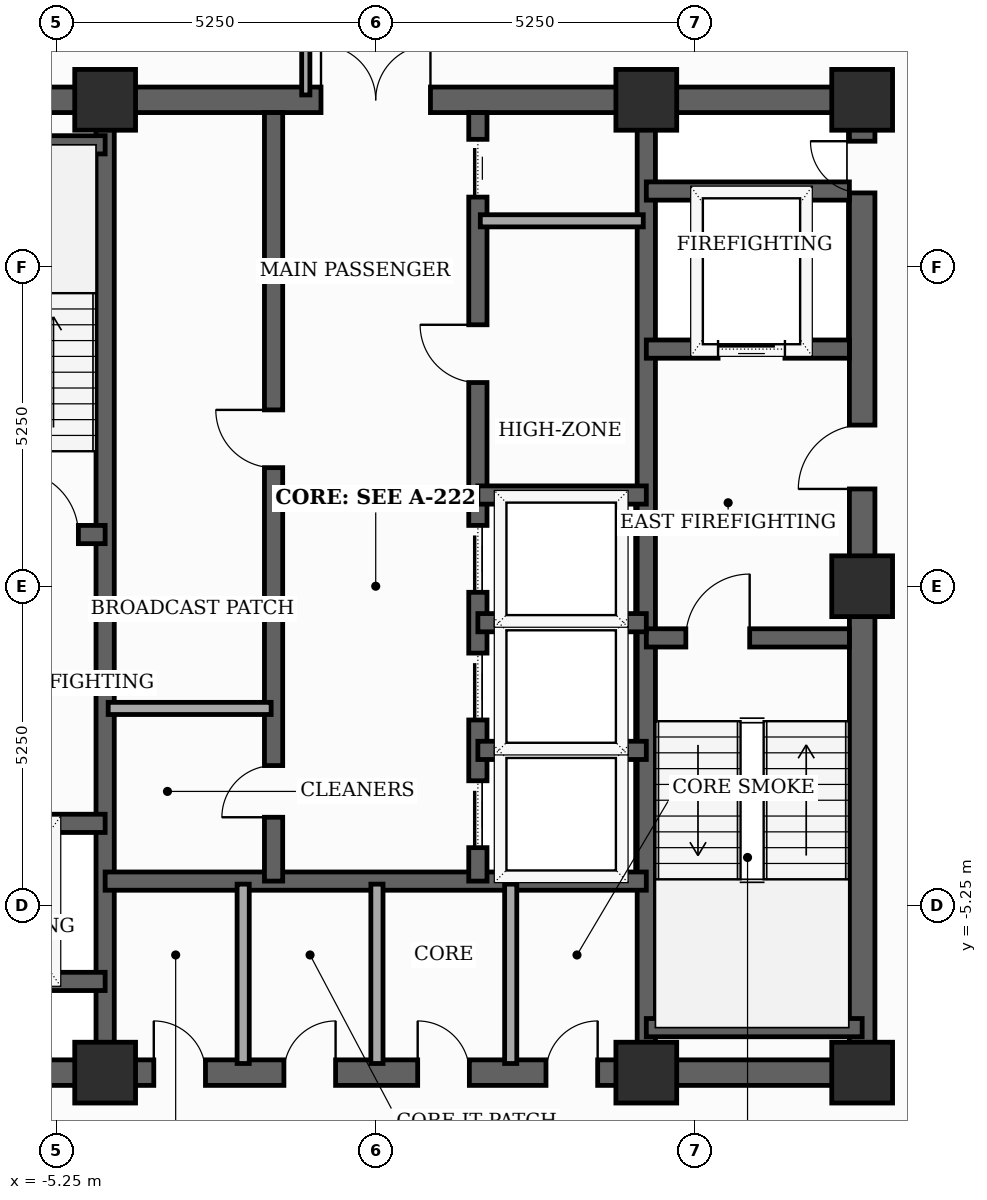
"""IFC4 building model, lengths in metres.
Left out: names, types, materials, properties, quantities, classifications, styles, units other than length and angle.
Written with IfcOpenShell. Run it as: python <this file> out.ifc"""

import sys

from ifc_helpers import new_model, si_unit, direction, frame, frame_2d, origin, origin_2d, place, context, subcontext, project, spatial, rectangle, extrude, element, fill, save


model = new_model("IFC4")
c1 = context("Model", 3, precision=1e-05, world=origin(), true_north=direction((0.0, 1.0)))
c2 = subcontext(c1, "Body", "Model", "MODEL_VIEW")
j1 = project(units=[si_unit("LENGTHUNIT", "METRE"), si_unit("PLANEANGLEUNIT", "RADIAN")], contexts=[c1])
p1 = place(None, origin())
s1 = spatial("IfcSite", under=j1, at=p1, CompositionType="ELEMENT")
p2 = place(p1, origin())
s2 = spatial("IfcBuilding", under=s1, at=p2, CompositionType="ELEMENT")
p3 = place(p2, frame((0.0, 0.0, 309.1)))
s3 = spatial("IfcBuildingStorey", under=s2, at=p3, CompositionType="ELEMENT", Elevation=309.1)
for number, where, z_axis, x_axis in (
    (1, (-4.45, -8.0, 0.0), (0.0, 0.0, 1.0), (1.0, 0.0, 0.0)),
    (2, (4.45, -8.0, 0.0), (0.0, 0.0, 1.0), (1.0, 0.0, 0.0)),
    (3, (8.0, -8.0, 0.0), (0.0, 0.0, 1.0), (1.0, 0.0, 0.0)),
    (4, (8.0, 0.0, 0.0), (0.0, 0.0, 1.0), (1.0, 0.0, 0.0)),
    (5, (8.0, 8.0, 0.0), (0.0, 0.0, 1.0), (1.0, 0.0, 0.0)),
    (6, (4.45, 8.0, 0.0), (0.0, 0.0, 1.0), (1.0, 0.0, 0.0)),
    (7, (-4.45, 8.0, 0.0), (0.0, 0.0, 1.0), (1.0, 0.0, 0.0)),
):
    element("IfcColumn", number, at=place(p3, frame(where, z_axis=z_axis, x_axis=x_axis)), inside=s3, PredefinedType="COLUMN", context=c2, shape_type="SweptSolid", body=[
        extrude(rectangle(XDim=1.0, YDim=1.0, at=origin_2d()), origin(), (0.0, 0.0, 1.0), 3.7),
    ])
p4 = place(p3, frame((8.0, -8.0, 0.0), z_axis=(0.0, 0.0, 1.0), x_axis=(0.0, 1.0, 0.0)))
e8 = element("IfcWall", 8, at=p4, inside=s3, PredefinedType="SHEAR", context=c2, shape_type="SweptSolid", body=[
    extrude(rectangle(XDim=16.0, YDim=0.42, at=frame_2d((8.0, 0.0))), origin(), (0.0, 0.0, 1.0), 3.44),
])
p5 = place(p4, frame((9.6, 0.0, 0.0)))
e9 = element("IfcOpeningElement", 9, at=p5, cuts=e8, PredefinedType="OPENING", context=c2, shape_type="SweptSolid", body=[
    extrude(rectangle(XDim=1.05, YDim=2.15, at=frame_2d((0.525, 1.075))), frame((0.0, 0.22, 0.0), z_axis=(0.0, -1.0, 0.0), x_axis=(1.0, 0.0, 0.0)), (0.0, 0.0, 1.0), 0.44),
])
p6 = place(p4, frame((14.469, 0.0, 0.0)))
e10 = element("IfcOpeningElement", 10, at=p6, cuts=e8, PredefinedType="OPENING", context=c2, shape_type="SweptSolid", body=[
    extrude(rectangle(XDim=0.85, YDim=2.02, at=frame_2d((0.425, 1.01))), frame((0.0, 0.22, 0.0), z_axis=(0.0, -1.0, 0.0), x_axis=(1.0, 0.0, 0.0)), (0.0, 0.0, 1.0), 0.44),
])
p7 = place(p3, frame((-8.0, -8.0, 0.0), z_axis=(0.0, 0.0, 1.0), x_axis=(1.0, 0.0, 0.0)))
e11 = element("IfcWall", 11, at=p7, inside=s3, PredefinedType="SHEAR", context=c2, shape_type="SweptSolid", body=[
    extrude(rectangle(XDim=16.0, YDim=0.42, at=frame_2d((8.0, 0.0))), origin(), (0.0, 0.0, 1.0), 3.44),
])
p8 = place(p7, frame((4.35, 0.0, 0.0)))
e12 = element("IfcOpeningElement", 12, at=p8, cuts=e11, PredefinedType="OPENING", context=c2, shape_type="SweptSolid", body=[
    extrude(rectangle(XDim=0.85, YDim=2.02, at=frame_2d((0.425, 1.01))), frame((0.0, 0.22, 0.0), z_axis=(0.0, -1.0, 0.0), x_axis=(1.0, 0.0, 0.0)), (0.0, 0.0, 1.0), 0.44),
])
p9 = place(p7, frame((6.49, 0.0, 0.0)))
e13 = element("IfcOpeningElement", 13, at=p9, cuts=e11, PredefinedType="OPENING", context=c2, shape_type="SweptSolid", body=[
    extrude(rectangle(XDim=0.85, YDim=2.02, at=frame_2d((0.425, 1.01))), frame((0.0, 0.22, 0.0), z_axis=(0.0, -1.0, 0.0), x_axis=(1.0, 0.0, 0.0)), (0.0, 0.0, 1.0), 0.44),
])
p10 = place(p7, frame((8.69, 0.0, 0.0)))
e14 = element("IfcOpeningElement", 14, at=p10, cuts=e11, PredefinedType="OPENING", context=c2, shape_type="SweptSolid", body=[
    extrude(rectangle(XDim=0.85, YDim=2.02, at=frame_2d((0.425, 1.01))), frame((0.0, 0.22, 0.0), z_axis=(0.0, -1.0, 0.0), x_axis=(1.0, 0.0, 0.0)), (0.0, 0.0, 1.0), 0.44),
])
p11 = place(p7, frame((10.8, 0.0, 0.0)))
e15 = element("IfcOpeningElement", 15, at=p11, cuts=e11, PredefinedType="OPENING", context=c2, shape_type="SweptSolid", body=[
    extrude(rectangle(XDim=0.85, YDim=2.02, at=frame_2d((0.425, 1.01))), frame((0.0, 0.22, 0.0), z_axis=(0.0, -1.0, 0.0), x_axis=(1.0, 0.0, 0.0)), (0.0, 0.0, 1.0), 0.44),
])
p12 = place(p3, frame((-8.0, 8.0, 0.0), z_axis=(0.0, 0.0, 1.0), x_axis=(1.0, 0.0, 0.0)))
e16 = element("IfcWall", 16, at=p12, inside=s3, PredefinedType="SHEAR", context=c2, shape_type="SweptSolid", body=[
    extrude(rectangle(XDim=16.0, YDim=0.42, at=frame_2d((8.0, 0.0))), origin(), (0.0, 0.0, 1.0), 3.44),
])
p13 = place(p12, frame((7.1, 0.0, 0.0)))
e17 = element("IfcOpeningElement", 17, at=p13, cuts=e16, PredefinedType="OPENING", context=c2, shape_type="SweptSolid", body=[
    extrude(rectangle(XDim=1.8, YDim=2.15, at=frame_2d((0.9, 1.075))), frame((0.0, 0.22, 0.0), z_axis=(0.0, -1.0, 0.0), x_axis=(1.0, 0.0, 0.0)), (0.0, 0.0, 1.0), 0.44),
])
for number, where, z_axis, x_axis in (
    (18, (-4.45, -7.79, 0.0), (0.0, 0.0, 1.0), (0.0, 1.0, 0.0)),
    (19, (4.45, -7.79, 0.0), (0.0, 0.0, 1.0), (0.0, 1.0, 0.0)),
):
    element("IfcWall", number, at=place(p3, frame(where, z_axis=z_axis, x_axis=x_axis)), inside=s3, PredefinedType="SHEAR", context=c2, shape_type="SweptSolid", body=[
        extrude(rectangle(XDim=15.58, YDim=0.3, at=frame_2d((7.79, 0.0))), origin(), (0.0, 0.0, 1.0), 3.44),
    ])
p14 = place(p3, frame((-7.79, 0.85, 0.0), z_axis=(0.0, 0.0, 1.0), x_axis=(1.0, 0.0, 0.0)))
e20 = element("IfcWall", 20, at=p14, inside=s3, PredefinedType="SHEAR", context=c2, shape_type="SweptSolid", body=[
    extrude(rectangle(XDim=3.34, YDim=0.3, at=frame_2d((1.67, 0.0))), origin(), (0.0, 0.0, 1.0), 3.44),
])
p15 = place(p14, frame((1.85, 0.0, 0.0)))
e21 = element("IfcOpeningElement", 21, at=p15, cuts=e20, PredefinedType="OPENING", context=c2, shape_type="SweptSolid", body=[
    extrude(rectangle(XDim=1.05, YDim=2.15, at=frame_2d((0.525, 1.075))), frame((0.0, 0.16, 0.0), z_axis=(0.0, -1.0, 0.0), x_axis=(1.0, 0.0, 0.0)), (0.0, 0.0, 1.0), 0.32),
])
p16 = place(p3, frame((-7.79, 7.26, 0.0), z_axis=(0.0, 0.0, 1.0), x_axis=(1.0, 0.0, 0.0)))
e22 = element("IfcWall", 22, at=p16, inside=s3, PredefinedType="SHEAR", context=c2, shape_type="SweptSolid", body=[
    extrude(rectangle(XDim=3.34, YDim=0.3, at=frame_2d((1.67, 0.0))), origin(), (0.0, 0.0, 1.0), 3.44),
])
p17 = place(p3, frame((4.45, -0.85, 0.0), z_axis=(0.0, 0.0, 1.0), x_axis=(1.0, 0.0, 0.0)))
e23 = element("IfcWall", 23, at=p17, inside=s3, PredefinedType="SHEAR", context=c2, shape_type="SweptSolid", body=[
    extrude(rectangle(XDim=3.34, YDim=0.3, at=frame_2d((1.67, 0.0))), origin(), (0.0, 0.0, 1.0), 3.44),
])
p18 = place(p17, frame((0.65, 0.0, 0.0)))
e24 = element("IfcOpeningElement", 24, at=p18, cuts=e23, PredefinedType="OPENING", context=c2, shape_type="SweptSolid", body=[
    extrude(rectangle(XDim=1.05, YDim=2.15, at=frame_2d((0.525, 1.075))), frame((0.0, 0.16, 0.0), z_axis=(0.0, -1.0, 0.0), x_axis=(1.0, 0.0, 0.0)), (0.0, 0.0, 1.0), 0.32),
])
p19 = place(p3, frame((4.45, -7.26, 0.0), z_axis=(0.0, 0.0, 1.0), x_axis=(1.0, 0.0, 0.0)))
e25 = element("IfcWall", 25, at=p19, inside=s3, PredefinedType="SHEAR", context=c2, shape_type="SweptSolid", body=[
    extrude(rectangle(XDim=3.55, YDim=0.3, at=frame_2d((1.775, 0.0))), origin(), (0.0, 0.0, 1.0), 3.44),
])
p20 = place(p3, frame((-7.79, -3.9, 0.0), z_axis=(0.0, 0.0, 1.0), x_axis=(1.0, 0.0, 0.0)))
e26 = element("IfcWall", 26, at=p20, inside=s3, PredefinedType="SHEAR", context=c2, shape_type="SweptSolid", body=[
    extrude(rectangle(XDim=3.34, YDim=0.3, at=frame_2d((1.67, 0.0))), origin(), (0.0, 0.0, 1.0), 3.44),
])
p21 = place(p20, frame((1.27, 0.0, 0.0)))
e27 = element("IfcOpeningElement", 27, at=p21, cuts=e26, PredefinedType="OPENING", context=c2, shape_type="SweptSolid", body=[
    extrude(rectangle(XDim=1.1, YDim=2.1, at=frame_2d((0.55, 1.05))), frame((0.0, 0.16, 0.0), z_axis=(0.0, -1.0, 0.0), x_axis=(1.0, 0.0, 0.0)), (0.0, 0.0, 1.0), 0.32),
])
p22 = place(p3, frame((-7.79, -6.5, 0.0), z_axis=(0.0, 0.0, 1.0), x_axis=(1.0, 0.0, 0.0)))
e28 = element("IfcWall", 28, at=p22, inside=s3, PredefinedType="SHEAR", context=c2, shape_type="SweptSolid", body=[
    extrude(rectangle(XDim=3.34, YDim=0.3, at=frame_2d((1.67, 0.0))), origin(), (0.0, 0.0, 1.0), 3.44),
])
p23 = place(p3, frame((4.45, 3.9, 0.0), z_axis=(0.0, 0.0, 1.0), x_axis=(1.0, 0.0, 0.0)))
e29 = element("IfcWall", 29, at=p23, inside=s3, PredefinedType="SHEAR", context=c2, shape_type="SweptSolid", body=[
    extrude(rectangle(XDim=3.34, YDim=0.3, at=frame_2d((1.67, 0.0))), origin(), (0.0, 0.0, 1.0), 3.44),
])
p24 = place(p23, frame((1.18, 0.0, 0.0)))
e30 = element("IfcOpeningElement", 30, at=p24, cuts=e29, PredefinedType="OPENING", context=c2, shape_type="SweptSolid", body=[
    extrude(rectangle(XDim=1.1, YDim=2.1, at=frame_2d((0.55, 1.05))), frame((0.0, 0.16, 0.0), z_axis=(0.0, -1.0, 0.0), x_axis=(1.0, 0.0, 0.0)), (0.0, 0.0, 1.0), 0.32),
])
p25 = place(p3, frame((4.45, 6.5, 0.0), z_axis=(0.0, 0.0, 1.0), x_axis=(1.0, 0.0, 0.0)))
e31 = element("IfcWall", 31, at=p25, inside=s3, PredefinedType="SHEAR", context=c2, shape_type="SweptSolid", body=[
    extrude(rectangle(XDim=3.34, YDim=0.3, at=frame_2d((1.67, 0.0))), origin(), (0.0, 0.0, 1.0), 3.44),
])
p26 = place(p3, frame((-4.45, -4.85, 0.0), z_axis=(0.0, 0.0, 1.0), x_axis=(1.0, 0.0, 0.0)))
e32 = element("IfcWall", 32, at=p26, inside=s3, PredefinedType="SHEAR", context=c2, shape_type="SweptSolid", body=[
    extrude(rectangle(XDim=8.9, YDim=0.3, at=frame_2d((4.45, 0.0))), origin(), (0.0, 0.0, 1.0), 3.44),
])
p27 = place(p3, frame((-1.68, -4.85, 0.0), z_axis=(0.0, 0.0, 1.0), x_axis=(0.0, 1.0, 0.0)))
e33 = element("IfcWall", 33, at=p27, inside=s3, PredefinedType="SHEAR", context=c2, shape_type="SweptSolid", body=[
    extrude(rectangle(XDim=12.64, YDim=0.3, at=frame_2d((6.32, 0.0))), origin(), (0.0, 0.0, 1.0), 3.44),
])
p28 = place(p27, frame((1.05, 0.0, 0.0)))
e34 = element("IfcOpeningElement", 34, at=p28, cuts=e33, PredefinedType="OPENING", context=c2, shape_type="SweptSolid", body=[
    extrude(rectangle(XDim=0.85, YDim=2.02, at=frame_2d((0.425, 1.01))), frame((0.0, 0.16, 0.0), z_axis=(0.0, -1.0, 0.0), x_axis=(1.0, 0.0, 0.0)), (0.0, 0.0, 1.0), 0.32),
])
p29 = place(p27, frame((6.8, 0.0, 0.0)))
e35 = element("IfcOpeningElement", 35, at=p29, cuts=e33, PredefinedType="OPENING", context=c2, shape_type="SweptSolid", body=[
    extrude(rectangle(XDim=0.95, YDim=2.1, at=frame_2d((0.475, 1.05))), frame((0.0, 0.16, 0.0), z_axis=(0.0, -1.0, 0.0), x_axis=(1.0, 0.0, 0.0)), (0.0, 0.0, 1.0), 0.32),
])
p30 = place(p3, frame((1.68, -4.85, 0.0), z_axis=(0.0, 0.0, 1.0), x_axis=(0.0, 1.0, 0.0)))
e36 = element("IfcWall", 36, at=p30, inside=s3, PredefinedType="SHEAR", context=c2, shape_type="SweptSolid", body=[
    extrude(rectangle(XDim=12.64, YDim=0.3, at=frame_2d((6.32, 0.0))), origin(), (0.0, 0.0, 1.0), 3.44),
])
p31 = place(p30, frame((0.55, 0.0, 0.0)))
e37 = element("IfcOpeningElement", 37, at=p31, cuts=e36, PredefinedType="OPENING", context=c2, shape_type="SweptSolid", body=[
    extrude(rectangle(XDim=1.1, YDim=2.1, at=frame_2d((0.55, 1.05))), frame((0.0, 0.16, 0.0), z_axis=(0.0, -1.0, 0.0), x_axis=(1.0, 0.0, 0.0)), (0.0, 0.0, 1.0), 0.32),
])
p32 = place(p30, frame((2.65, 0.0, 0.0)))
e38 = element("IfcOpeningElement", 38, at=p32, cuts=e36, PredefinedType="OPENING", context=c2, shape_type="SweptSolid", body=[
    extrude(rectangle(XDim=1.1, YDim=2.1, at=frame_2d((0.55, 1.05))), frame((0.0, 0.16, 0.0), z_axis=(0.0, -1.0, 0.0), x_axis=(1.0, 0.0, 0.0)), (0.0, 0.0, 1.0), 0.32),
])
p33 = place(p30, frame((4.75, 0.0, 0.0)))
e39 = element("IfcOpeningElement", 39, at=p33, cuts=e36, PredefinedType="OPENING", context=c2, shape_type="SweptSolid", body=[
    extrude(rectangle(XDim=1.1, YDim=2.1, at=frame_2d((0.55, 1.05))), frame((0.0, 0.16, 0.0), z_axis=(0.0, -1.0, 0.0), x_axis=(1.0, 0.0, 0.0)), (0.0, 0.0, 1.0), 0.32),
])
p34 = place(p30, frame((8.2, 0.0, 0.0)))
e40 = element("IfcOpeningElement", 40, at=p34, cuts=e36, PredefinedType="OPENING", context=c2, shape_type="SweptSolid", body=[
    extrude(rectangle(XDim=0.95, YDim=2.1, at=frame_2d((0.475, 1.05))), frame((0.0, 0.16, 0.0), z_axis=(0.0, -1.0, 0.0), x_axis=(1.0, 0.0, 0.0)), (0.0, 0.0, 1.0), 0.32),
])
p35 = place(p30, frame((11.25, 0.0, 0.0)))
e41 = element("IfcOpeningElement", 41, at=p35, cuts=e36, PredefinedType="OPENING", context=c2, shape_type="SweptSolid", body=[
    extrude(rectangle(XDim=0.95, YDim=2.1, at=frame_2d((0.475, 1.05))), frame((0.0, 0.16, 0.0), z_axis=(0.0, -1.0, 0.0), x_axis=(1.0, 0.0, 0.0)), (0.0, 0.0, 1.0), 0.32),
])
for number, where, z_axis, x_axis in (
    (42, (1.68, 1.5, 0.0), (0.0, 0.0, 1.0), (1.0, 0.0, 0.0)),
    (43, (1.68, -2.7, 0.0), (0.0, 0.0, 1.0), (1.0, 0.0, 0.0)),
    (44, (1.68, -0.6, 0.0), (0.0, 0.0, 1.0), (1.0, 0.0, 0.0)),
):
    element("IfcWall", number, at=place(p3, frame(where, z_axis=z_axis, x_axis=x_axis)), inside=s3, PredefinedType="SHEAR", context=c2, shape_type="SweptSolid", body=[
        extrude(rectangle(XDim=2.77, YDim=0.3, at=frame_2d((1.385, 0.0))), origin(), (0.0, 0.0, 1.0), 3.44),
    ])
for number, where, z_axis, x_axis in (
    (45, (-2.18, -7.85, 0.0), (0.0, 0.0, 1.0), (0.0, 1.0, 0.0)),
    (46, (0.02, -7.85, 0.0), (0.0, 0.0, 1.0), (0.0, 1.0, 0.0)),
    (47, (2.22, -7.85, 0.0), (0.0, 0.0, 1.0), (0.0, 1.0, 0.0)),
):
    element("IfcWall", number, at=place(p3, frame(where, z_axis=z_axis, x_axis=x_axis)), inside=s3, PredefinedType="SOLIDWALL", context=c2, shape_type="SweptSolid", body=[
        extrude(rectangle(XDim=2.95, YDim=0.2, at=frame_2d((1.475, 0.0))), origin(), (0.0, 0.0, 1.0), 2.825),
    ])
for number, where, z_axis, x_axis in (
    (48, (-4.4, -2.01, 0.0), (0.0, 0.0, 1.0), (1.0, 0.0, 0.0)),
    (49, (1.72, 6.01, 0.0), (0.0, 0.0, 1.0), (1.0, 0.0, 0.0)),
):
    element("IfcWall", number, at=place(p3, frame(where, z_axis=z_axis, x_axis=x_axis)), inside=s3, PredefinedType="SOLIDWALL", context=c2, shape_type="SweptSolid", body=[
        extrude(rectangle(XDim=2.68, YDim=0.2, at=frame_2d((1.34, 0.0))), origin(), (0.0, 0.0, 1.0), 3.44),
    ])
p36 = place(p3, frame((-1.15, 10.65, 0.0), z_axis=(0.0, 0.0, 1.0), x_axis=(0.0, -1.0, 0.0)))
e50 = element("IfcWall", 50, at=p36, inside=s3, PredefinedType="PARTITIONING", context=c2, shape_type="SweptSolid", body=[
    extrude(rectangle(XDim=2.57, YDim=0.135, at=frame_2d((1.285, 0.0))), origin(), (0.0, 0.0, 1.0), 2.825),
])
p37 = place(p5, origin())
e51 = element("IfcDoor", 51, at=p37, inside=s3, OperationType="SINGLE_SWING_LEFT", PredefinedType="DOOR", context=c2, shape_type="SweptSolid", body=[
    extrude(rectangle(XDim=1.05, YDim=2.15, at=frame_2d((0.525, 1.075))), frame((0.0, 0.025, 0.0), z_axis=(0.0, -1.0, 0.0), x_axis=(1.0, 0.0, 0.0)), (0.0, 0.0, 1.0), 0.05),
])
fill(e9, e51)
p38 = place(p6, origin())
e52 = element("IfcDoor", 52, at=p38, inside=s3, OperationType="SINGLE_SWING_RIGHT", PredefinedType="TRAPDOOR", context=c2, shape_type="SweptSolid", body=[
    extrude(rectangle(XDim=0.85, YDim=2.02, at=frame_2d((0.425, 1.01))), frame((0.0, 0.025, 0.0), z_axis=(0.0, -1.0, 0.0), x_axis=(1.0, 0.0, 0.0)), (0.0, 0.0, 1.0), 0.05),
])
fill(e10, e52)
p39 = place(p8, origin())
e53 = element("IfcDoor", 53, at=p39, inside=s3, OperationType="SINGLE_SWING_LEFT", PredefinedType="TRAPDOOR", context=c2, shape_type="SweptSolid", body=[
    extrude(rectangle(XDim=0.85, YDim=2.02, at=frame_2d((0.425, 1.01))), frame((0.0, 0.025, 0.0), z_axis=(0.0, -1.0, 0.0), x_axis=(1.0, 0.0, 0.0)), (0.0, 0.0, 1.0), 0.05),
])
fill(e12, e53)
p40 = place(p9, origin())
e54 = element("IfcDoor", 54, at=p40, inside=s3, OperationType="SINGLE_SWING_RIGHT", PredefinedType="TRAPDOOR", context=c2, shape_type="SweptSolid", body=[
    extrude(rectangle(XDim=0.85, YDim=2.02, at=frame_2d((0.425, 1.01))), frame((0.0, 0.025, 0.0), z_axis=(0.0, -1.0, 0.0), x_axis=(1.0, 0.0, 0.0)), (0.0, 0.0, 1.0), 0.05),
])
fill(e13, e54)
p41 = place(p10, origin())
e55 = element("IfcDoor", 55, at=p41, inside=s3, OperationType="SINGLE_SWING_LEFT", PredefinedType="TRAPDOOR", context=c2, shape_type="SweptSolid", body=[
    extrude(rectangle(XDim=0.85, YDim=2.02, at=frame_2d((0.425, 1.01))), frame((0.0, 0.025, 0.0), z_axis=(0.0, -1.0, 0.0), x_axis=(1.0, 0.0, 0.0)), (0.0, 0.0, 1.0), 0.05),
])
fill(e14, e55)
p42 = place(p11, origin())
e56 = element("IfcDoor", 56, at=p42, inside=s3, OperationType="SINGLE_SWING_RIGHT", PredefinedType="TRAPDOOR", context=c2, shape_type="SweptSolid", body=[
    extrude(rectangle(XDim=0.85, YDim=2.02, at=frame_2d((0.425, 1.01))), frame((0.0, 0.025, 0.0), z_axis=(0.0, -1.0, 0.0), x_axis=(1.0, 0.0, 0.0)), (0.0, 0.0, 1.0), 0.05),
])
fill(e15, e56)
p43 = place(p13, origin())
e57 = element("IfcDoor", 57, at=p43, inside=s3, OperationType="DOUBLE_DOOR_SINGLE_SWING", PredefinedType="DOOR", context=c2, shape_type="SweptSolid", body=[
    extrude(rectangle(XDim=1.8, YDim=2.15, at=frame_2d((0.9, 1.075))), frame((0.0, 0.025, 0.0), z_axis=(0.0, -1.0, 0.0), x_axis=(1.0, 0.0, 0.0)), (0.0, 0.0, 1.0), 0.05),
])
fill(e17, e57)
p44 = place(p15, origin())
e58 = element("IfcDoor", 58, at=p44, inside=s3, OperationType="SINGLE_SWING_LEFT", PredefinedType="DOOR", context=c2, shape_type="SweptSolid", body=[
    extrude(rectangle(XDim=1.05, YDim=2.15, at=frame_2d((0.525, 1.075))), frame((0.0, 0.025, 0.0), z_axis=(0.0, -1.0, 0.0), x_axis=(1.0, 0.0, 0.0)), (0.0, 0.0, 1.0), 0.05),
])
fill(e21, e58)
p45 = place(p18, origin())
e59 = element("IfcDoor", 59, at=p45, inside=s3, OperationType="SINGLE_SWING_RIGHT", PredefinedType="DOOR", context=c2, shape_type="SweptSolid", body=[
    extrude(rectangle(XDim=1.05, YDim=2.15, at=frame_2d((0.525, 1.075))), frame((0.0, 0.025, 0.0), z_axis=(0.0, -1.0, 0.0), x_axis=(1.0, 0.0, 0.0)), (0.0, 0.0, 1.0), 0.05),
])
fill(e24, e59)
p46 = place(p24, origin())
e60 = element("IfcDoor", 60, at=p46, inside=s3, OperationType="SLIDING_TO_LEFT", PredefinedType="DOOR", context=c2, shape_type="SweptSolid", body=[
    extrude(rectangle(XDim=1.1, YDim=2.1, at=frame_2d((0.55, 1.05))), frame((0.0, 0.025, 0.0), z_axis=(0.0, -1.0, 0.0), x_axis=(1.0, 0.0, 0.0)), (0.0, 0.0, 1.0), 0.05),
])
fill(e30, e60)
p47 = place(p28, origin())
e61 = element("IfcDoor", 61, at=p47, inside=s3, OperationType="SINGLE_SWING_LEFT", PredefinedType="TRAPDOOR", context=c2, shape_type="SweptSolid", body=[
    extrude(rectangle(XDim=0.85, YDim=2.02, at=frame_2d((0.425, 1.01))), frame((0.0, 0.025, 0.0), z_axis=(0.0, -1.0, 0.0), x_axis=(1.0, 0.0, 0.0)), (0.0, 0.0, 1.0), 0.05),
])
fill(e34, e61)
p48 = place(p29, origin())
e62 = element("IfcDoor", 62, at=p48, inside=s3, OperationType="SINGLE_SWING_RIGHT", PredefinedType="DOOR", context=c2, shape_type="SweptSolid", body=[
    extrude(rectangle(XDim=0.95, YDim=2.1, at=frame_2d((0.475, 1.05))), frame((0.0, 0.025, 0.0), z_axis=(0.0, -1.0, 0.0), x_axis=(1.0, 0.0, 0.0)), (0.0, 0.0, 1.0), 0.05),
])
fill(e35, e62)
p49 = place(p31, origin())
e63 = element("IfcDoor", 63, at=p49, inside=s3, OperationType="SLIDING_TO_LEFT", PredefinedType="DOOR", context=c2, shape_type="SweptSolid", body=[
    extrude(rectangle(XDim=1.1, YDim=2.1, at=frame_2d((0.55, 1.05))), frame((0.0, 0.025, 0.0), z_axis=(0.0, -1.0, 0.0), x_axis=(1.0, 0.0, 0.0)), (0.0, 0.0, 1.0), 0.05),
])
fill(e37, e63)
p50 = place(p32, origin())
e64 = element("IfcDoor", 64, at=p50, inside=s3, OperationType="SLIDING_TO_LEFT", PredefinedType="DOOR", context=c2, shape_type="SweptSolid", body=[
    extrude(rectangle(XDim=1.1, YDim=2.1, at=frame_2d((0.55, 1.05))), frame((0.0, 0.025, 0.0), z_axis=(0.0, -1.0, 0.0), x_axis=(1.0, 0.0, 0.0)), (0.0, 0.0, 1.0), 0.05),
])
fill(e38, e64)
p51 = place(p33, origin())
e65 = element("IfcDoor", 65, at=p51, inside=s3, OperationType="SLIDING_TO_LEFT", PredefinedType="DOOR", context=c2, shape_type="SweptSolid", body=[
    extrude(rectangle(XDim=1.1, YDim=2.1, at=frame_2d((0.55, 1.05))), frame((0.0, 0.025, 0.0), z_axis=(0.0, -1.0, 0.0), x_axis=(1.0, 0.0, 0.0)), (0.0, 0.0, 1.0), 0.05),
])
fill(e39, e65)
p52 = place(p34, origin())
e66 = element("IfcDoor", 66, at=p52, inside=s3, OperationType="SINGLE_SWING_RIGHT", PredefinedType="DOOR", context=c2, shape_type="SweptSolid", body=[
    extrude(rectangle(XDim=0.95, YDim=2.1, at=frame_2d((0.475, 1.05))), frame((0.0, 0.025, 0.0), z_axis=(0.0, -1.0, 0.0), x_axis=(1.0, 0.0, 0.0)), (0.0, 0.0, 1.0), 0.05),
])
fill(e40, e66)
p53 = place(p35, origin())
e67 = element("IfcDoor", 67, at=p53, inside=s3, OperationType="SLIDING_TO_LEFT", PredefinedType="DOOR", context=c2, shape_type="SweptSolid", body=[
    extrude(rectangle(XDim=0.95, YDim=2.1, at=frame_2d((0.475, 1.05))), frame((0.0, 0.025, 0.0), z_axis=(0.0, -1.0, 0.0), x_axis=(1.0, 0.0, 0.0)), (0.0, 0.0, 1.0), 0.05),
])
fill(e41, e67)
save(model, sys.argv[1])
